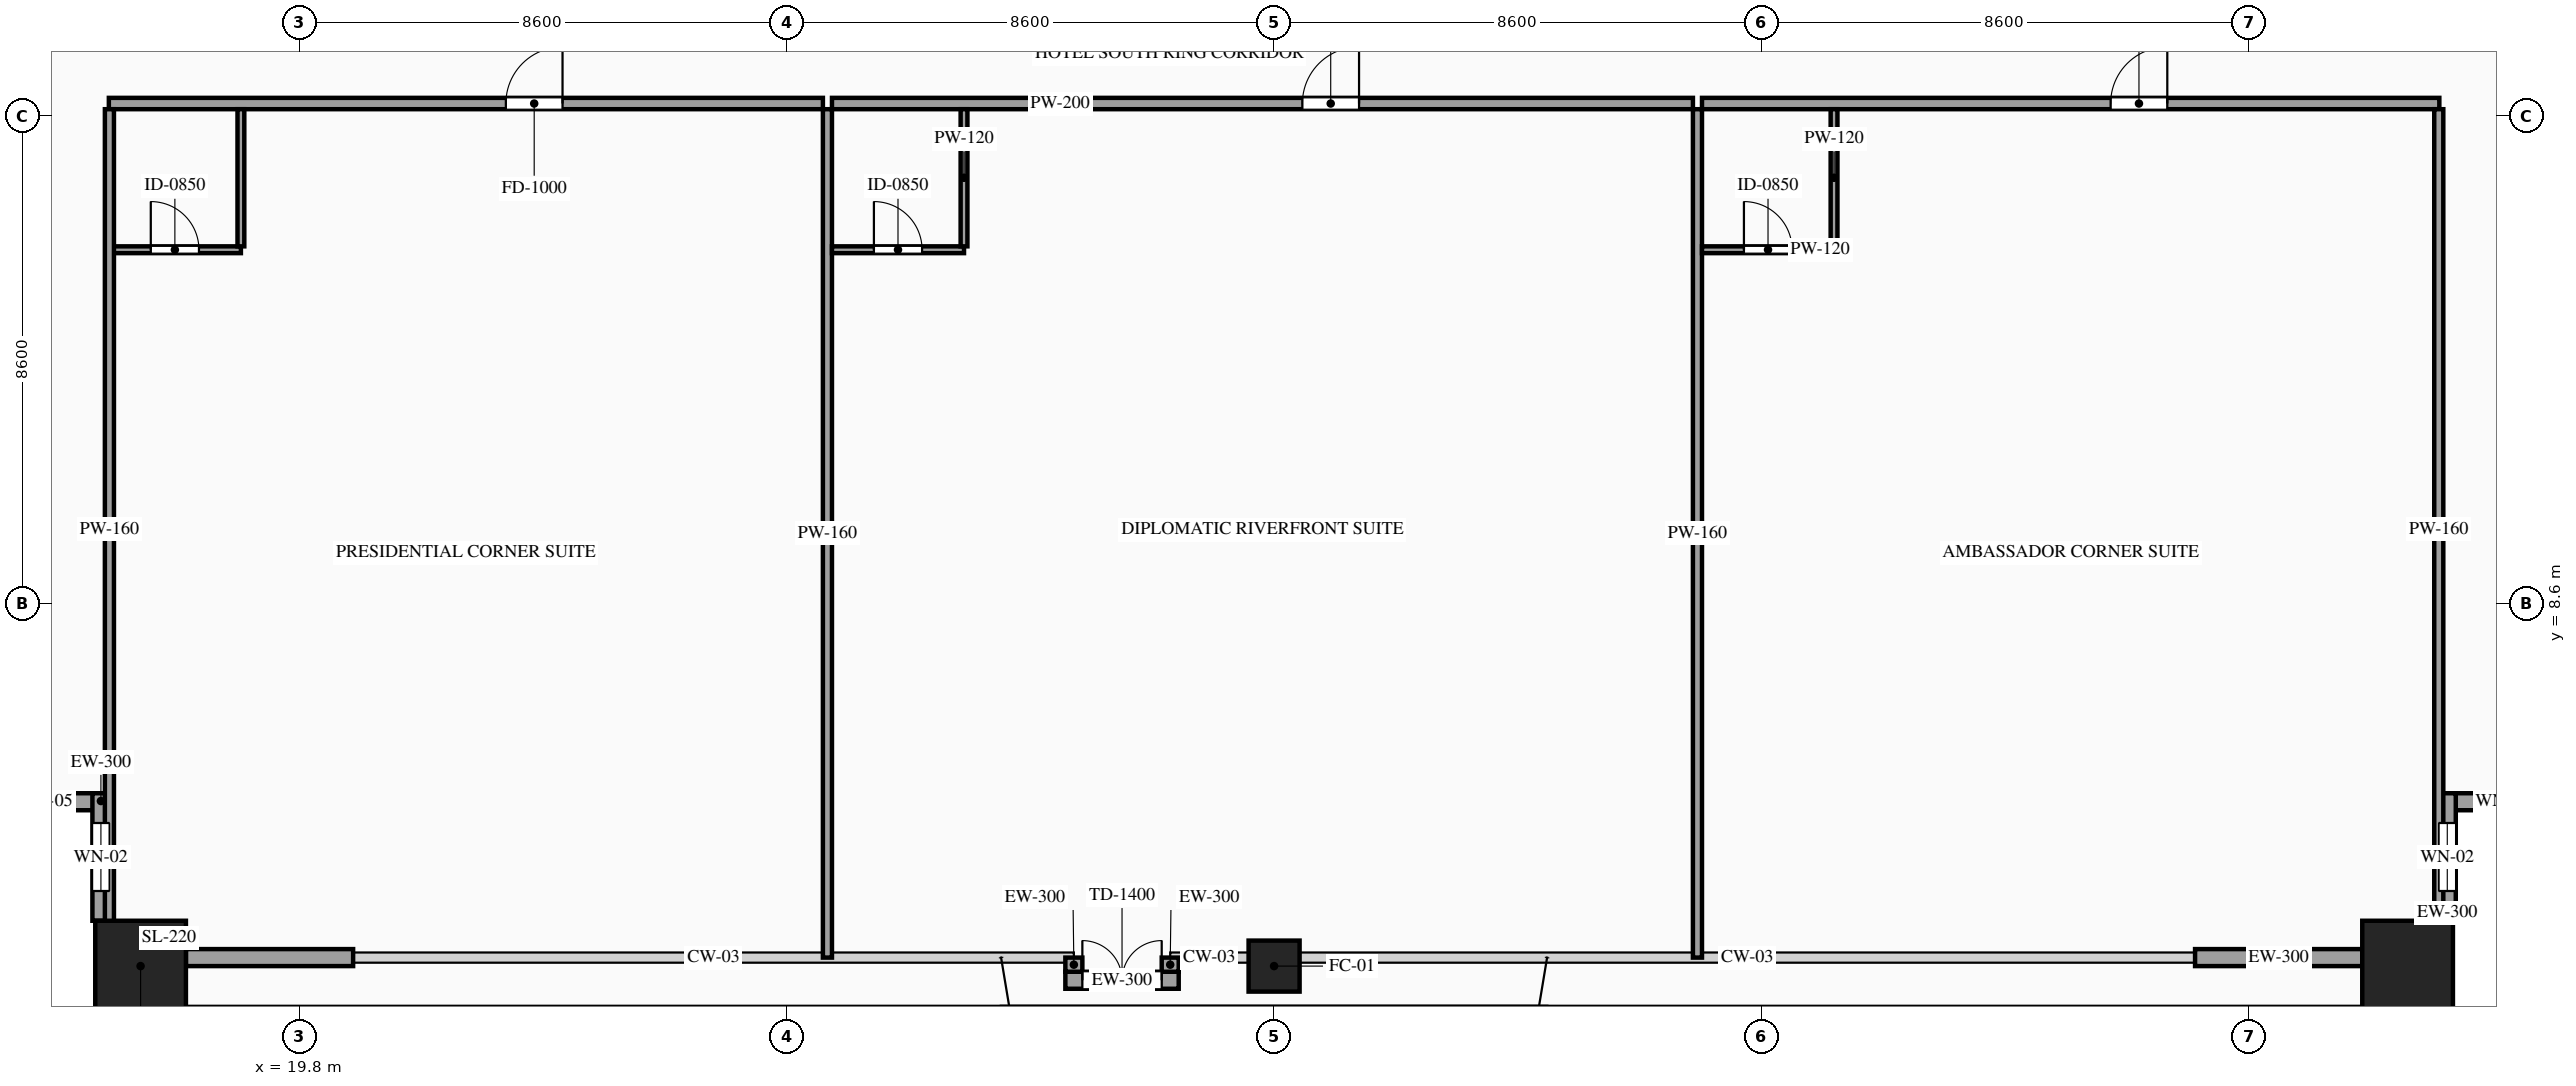
"""IFC4 building model, lengths in metres.
Left out: names, types, materials, properties, quantities, classifications, styles, units other than length and angle.
Written with IfcOpenShell. Run it as: python <this file> out.ifc"""

import sys

from ifc_helpers import new_model, si_unit, direction, frame, frame_2d, origin, origin_2d, place, context, subcontext, project, spatial, rectangle, hollow_rectangle, extrude, source, transform, mapped, element, fill, save


model = new_model("IFC4")
c1 = context("Model", 3, precision=1e-05, world=origin(), true_north=direction((0.0, 1.0)))
c2 = subcontext(c1, "Body", "Model", "MODEL_VIEW")
j1 = project(units=[si_unit("LENGTHUNIT", "METRE"), si_unit("PLANEANGLEUNIT", "RADIAN")], contexts=[c1])
p1 = place(None, origin())
s1 = spatial("IfcSite", under=j1, at=p1, CompositionType="ELEMENT")
p2 = place(p1, origin())
s2 = spatial("IfcBuilding", under=s1, at=p2, CompositionType="ELEMENT")
p3 = place(p2, frame((0.0, 0.0, 101.0)))
s3 = spatial("IfcBuildingStorey", under=s2, at=p3, CompositionType="ELEMENT", Elevation=101.0)
m1 = source(origin(), c2, "Body", "SweptSolid", [
    extrude(hollow_rectangle(XDim=1.6, YDim=1.6, WallThickness=0.07, at=origin_2d()), origin(), (0.0, 0.0, 1.0), 3.6),
])
p4 = place(p3, frame((17.0, 2.2, 0.0), z_axis=(0.0, 0.0, 1.0), x_axis=(1.0, 0.0, 0.0)))
e1 = element("IfcColumn", 1, at=p4, inside=s3, PredefinedType="COLUMN", context=c2, shape_type="MappedRepresentation", body=[
    mapped(m1, transform((0.0, 0.0, 0.0), scale=1.0)),
])
m2 = source(origin(), c2, "Body", "SweptSolid", [
    extrude(hollow_rectangle(XDim=0.9, YDim=0.9, WallThickness=0.042, at=origin_2d()), origin(), (0.0, 0.0, 1.0), 3.6),
])
p5 = place(p3, frame((37.0, 2.2, 0.0), z_axis=(0.0, 0.0, 1.0), x_axis=(1.0, 0.0, 0.0)))
e2 = element("IfcColumn", 2, at=p5, inside=s3, PredefinedType="COLUMN", context=c2, shape_type="MappedRepresentation", body=[
    mapped(m2, transform((0.0, 0.0, 0.0), scale=1.0)),
])
p6 = place(p3, frame((57.0, 2.2, 0.0), z_axis=(0.0, 0.0, 1.0), x_axis=(1.0, 0.0, 0.0)))
e3 = element("IfcColumn", 3, at=p6, inside=s3, PredefinedType="COLUMN", context=c2, shape_type="MappedRepresentation", body=[
    mapped(m1, transform((0.0, 0.0, 0.0), scale=1.0)),
])
p7 = place(p3, frame((14.2, 5.1, 0.0), z_axis=(0.0, 0.0, 1.0), x_axis=(1.0, 0.0, 0.0)))
e4 = element("IfcWall", 4, at=p7, inside=s3, PredefinedType="SOLIDWALL", context=c2, shape_type="SweptSolid", body=[
    extrude(rectangle(XDim=2.25, YDim=0.3, at=frame_2d((1.125, 0.0))), origin(), (0.0, 0.0, 1.0), 3.38),
])
p8 = place(p7, frame((0.675, 0.0, 0.85)))
e5 = element("IfcOpeningElement", 5, at=p8, cuts=e4, PredefinedType="OPENING", context=c2, shape_type="SweptSolid", body=[
    extrude(rectangle(XDim=0.9, YDim=1.5, at=frame_2d((0.45, 0.75))), frame((0.0, 0.165, 0.0), z_axis=(0.0, -1.0, 0.0), x_axis=(1.0, 0.0, 0.0)), (0.0, 0.0, 1.0), 0.33),
])
p9 = place(p3, frame((16.3, 5.25, 0.0), z_axis=(0.0, 0.0, 1.0), x_axis=(0.0, -1.0, 0.0)))
e6 = element("IfcWall", 6, at=p9, inside=s3, PredefinedType="SOLIDWALL", context=c2, shape_type="SweptSolid", body=[
    extrude(rectangle(XDim=2.25, YDim=0.3, at=frame_2d((1.125, 0.0))), origin(), (0.0, 0.0, 1.0), 3.38),
])
p10 = place(p9, frame((0.525, 0.0, 0.85)))
e7 = element("IfcOpeningElement", 7, at=p10, cuts=e6, PredefinedType="OPENING", context=c2, shape_type="SweptSolid", body=[
    extrude(rectangle(XDim=1.2, YDim=2.1, at=frame_2d((0.6, 1.05))), frame((0.0, 0.165, 0.0), z_axis=(0.0, -1.0, 0.0), x_axis=(1.0, 0.0, 0.0)), (0.0, 0.0, 1.0), 0.33),
])
p11 = place(p3, frame((57.55, 5.1, 0.0), z_axis=(0.0, 0.0, 1.0), x_axis=(1.0, 0.0, 0.0)))
e8 = element("IfcWall", 8, at=p11, inside=s3, PredefinedType="SOLIDWALL", context=c2, shape_type="SweptSolid", body=[
    extrude(rectangle(XDim=2.25, YDim=0.3, at=frame_2d((1.125, 0.0))), origin(), (0.0, 0.0, 1.0), 3.38),
])
p12 = place(p11, frame((0.675, 0.0, 0.85)))
e9 = element("IfcOpeningElement", 9, at=p12, cuts=e8, PredefinedType="OPENING", context=c2, shape_type="SweptSolid", body=[
    extrude(rectangle(XDim=0.9, YDim=1.5, at=frame_2d((0.45, 0.75))), frame((0.0, 0.165, 0.0), z_axis=(0.0, -1.0, 0.0), x_axis=(1.0, 0.0, 0.0)), (0.0, 0.0, 1.0), 0.33),
])
p13 = place(p3, frame((57.7, 3.0, 0.0), z_axis=(0.0, 0.0, 1.0), x_axis=(0.0, 1.0, 0.0)))
e10 = element("IfcWall", 10, at=p13, inside=s3, PredefinedType="SOLIDWALL", context=c2, shape_type="SweptSolid", body=[
    extrude(rectangle(XDim=2.25, YDim=0.3, at=frame_2d((1.125, 0.0))), origin(), (0.0, 0.0, 1.0), 3.38),
])
p14 = place(p13, frame((0.525, 0.0, 0.85)))
e11 = element("IfcOpeningElement", 11, at=p14, cuts=e10, PredefinedType="OPENING", context=c2, shape_type="SweptSolid", body=[
    extrude(rectangle(XDim=1.2, YDim=2.1, at=frame_2d((0.6, 1.05))), frame((0.0, 0.165, 0.0), z_axis=(0.0, -1.0, 0.0), x_axis=(1.0, 0.0, 0.0)), (0.0, 0.0, 1.0), 0.33),
])
m3 = source(origin(), c2, "Body", "SweptSolid", [
    extrude(rectangle(XDim=2.95, YDim=0.3, at=frame_2d((1.475, 0.0))), origin(), (0.0, 0.0, 1.0), 2.775),
])
for number, where, z_axis, x_axis in (
    (12, (17.8, 2.35, 0.0), (0.0, 0.0, 1.0), (1.0, 0.0, 0.0)),
    (13, (53.25, 2.35, 0.0), (0.0, 0.0, 1.0), (1.0, 0.0, 0.0)),
):
    element("IfcWall", number, at=place(p3, frame(where, z_axis=z_axis, x_axis=x_axis)), inside=s3, PredefinedType="SOLIDWALL", context=c2, shape_type="MappedRepresentation", body=[
        mapped(m3, transform((0.0, 0.0, 0.0), scale=1.0)),
    ])
p15 = place(p3, frame((33.317, 1.95, 0.0), z_axis=(0.0, 0.0, 1.0), x_axis=(1.0, 0.0, 0.0)))
e14 = element("IfcWall", 14, at=p15, inside=s3, PredefinedType="SOLIDWALL", context=c2, shape_type="SweptSolid", body=[
    extrude(rectangle(XDim=2.0, YDim=0.3, at=frame_2d((1.0, 0.0))), origin(), (0.0, 0.0, 1.0), 3.38),
])
p16 = place(p15, frame((0.3, 0.0, 0.0)))
e15 = element("IfcOpeningElement", 15, at=p16, cuts=e14, PredefinedType="OPENING", context=c2, shape_type="SweptSolid", body=[
    extrude(rectangle(XDim=1.4, YDim=2.3, at=frame_2d((0.7, 1.15))), frame((0.0, 0.165, 0.0), z_axis=(0.0, -1.0, 0.0), x_axis=(1.0, 0.0, 0.0)), (0.0, 0.0, 1.0), 0.33),
])
m4 = source(origin(), c2, "Body", "SweptSolid", [
    extrude(rectangle(XDim=0.25, YDim=0.3, at=frame_2d((0.125, 0.0))), origin(), (0.0, 0.0, 1.0), 3.38),
])
for number, where, z_axis, x_axis in (
    (16, (33.467, 2.35, 0.0), (0.0, 0.0, 1.0), (0.0, -1.0, 0.0)),
    (17, (35.167, 2.1, 0.0), (0.0, 0.0, 1.0), (0.0, 1.0, 0.0)),
):
    element("IfcWall", number, at=place(p3, frame(where, z_axis=z_axis, x_axis=x_axis)), inside=s3, PredefinedType="SOLIDWALL", context=c2, shape_type="MappedRepresentation", body=[
        mapped(m4, transform((0.0, 0.0, 0.0), scale=1.0)),
    ])
p17 = place(p3, frame((16.44, 17.42, 0.0), z_axis=(0.0, 0.0, 1.0), x_axis=(1.0, 0.0, 0.0)))
e18 = element("IfcWall", 18, at=p17, inside=s3, PredefinedType="PARTITIONING", context=c2, shape_type="SweptSolid", body=[
    extrude(rectangle(XDim=12.599, YDim=0.2, at=frame_2d((6.3, 0.0))), origin(), (0.0, 0.0, 1.0), 3.38),
])
p18 = place(p17, frame((7.005, 0.0, 0.0)))
e19 = element("IfcOpeningElement", 19, at=p18, cuts=e18, PredefinedType="OPENING", context=c2, shape_type="SweptSolid", body=[
    extrude(rectangle(XDim=1.0, YDim=2.2, at=frame_2d((0.5, 1.1))), frame((0.0, 0.115, 0.0), z_axis=(0.0, -1.0, 0.0), x_axis=(1.0, 0.0, 0.0)), (0.0, 0.0, 1.0), 0.23),
])
m5 = source(origin(), c2, "Body", "SweptSolid", [
    extrude(rectangle(XDim=14.97, YDim=0.16, at=frame_2d((7.485, 0.0))), origin(), (0.0, 0.0, 1.0), 3.38),
])
p19 = place(p3, frame((29.119, 2.35, 0.0), z_axis=(0.0, 0.0, 1.0), x_axis=(0.0, 1.0, 0.0)))
e20 = element("IfcWall", 20, at=p19, inside=s3, PredefinedType="PARTITIONING", context=c2, shape_type="MappedRepresentation", body=[
    mapped(m5, transform((0.0, 0.0, 0.0), scale=1.0)),
])
p20 = place(p3, frame((16.44, 14.84, 0.0), z_axis=(0.0, 0.0, 1.0), x_axis=(1.0, 0.0, 0.0)))
e21 = element("IfcWall", 21, at=p20, inside=s3, PredefinedType="PARTITIONING", context=c2, shape_type="SweptSolid", body=[
    extrude(rectangle(XDim=2.33, YDim=0.12, at=frame_2d((1.165, 0.0))), origin(), (0.0, 0.0, 1.0), 3.38),
])
p21 = place(p20, frame((0.74, 0.0, 0.0)))
e22 = element("IfcOpeningElement", 22, at=p21, cuts=e21, PredefinedType="OPENING", context=c2, shape_type="SweptSolid", body=[
    extrude(rectangle(XDim=0.85, YDim=2.1, at=frame_2d((0.425, 1.05))), frame((0.0, 0.075, 0.0), z_axis=(0.0, -1.0, 0.0), x_axis=(1.0, 0.0, 0.0)), (0.0, 0.0, 1.0), 0.15),
])
m6 = source(origin(), c2, "Body", "SweptSolid", [
    extrude(rectangle(XDim=2.42, YDim=0.12, at=frame_2d((1.21, 0.0))), origin(), (0.0, 0.0, 1.0), 3.38),
])
p22 = place(p3, frame((18.77, 14.9, 0.0), z_axis=(0.0, 0.0, 1.0), x_axis=(0.0, 1.0, 0.0)))
e23 = element("IfcWall", 23, at=p22, inside=s3, PredefinedType="PARTITIONING", context=c2, shape_type="MappedRepresentation", body=[
    mapped(m6, transform((0.0, 0.0, 0.0), scale=1.0)),
])
p23 = place(p3, frame((29.199, 17.42, 0.0), z_axis=(0.0, 0.0, 1.0), x_axis=(1.0, 0.0, 0.0)))
e24 = element("IfcWall", 24, at=p23, inside=s3, PredefinedType="PARTITIONING", context=c2, shape_type="SweptSolid", body=[
    extrude(rectangle(XDim=15.191, YDim=0.2, at=frame_2d((7.595, 0.0))), origin(), (0.0, 0.0, 1.0), 3.38),
])
p24 = place(p23, frame((8.3, 0.0, 0.0)))
e25 = element("IfcOpeningElement", 25, at=p24, cuts=e24, PredefinedType="OPENING", context=c2, shape_type="SweptSolid", body=[
    extrude(rectangle(XDim=1.0, YDim=2.2, at=frame_2d((0.5, 1.1))), frame((0.0, 0.115, 0.0), z_axis=(0.0, -1.0, 0.0), x_axis=(1.0, 0.0, 0.0)), (0.0, 0.0, 1.0), 0.23),
])
p25 = place(p3, frame((44.47, 2.35, 0.0), z_axis=(0.0, 0.0, 1.0), x_axis=(0.0, 1.0, 0.0)))
e26 = element("IfcWall", 26, at=p25, inside=s3, PredefinedType="PARTITIONING", context=c2, shape_type="MappedRepresentation", body=[
    mapped(m5, transform((0.0, 0.0, 0.0), scale=1.0)),
])
p26 = place(p3, frame((29.199, 14.84, 0.0), z_axis=(0.0, 0.0, 1.0), x_axis=(1.0, 0.0, 0.0)))
e27 = element("IfcWall", 27, at=p26, inside=s3, PredefinedType="PARTITIONING", context=c2, shape_type="SweptSolid", body=[
    extrude(rectangle(XDim=2.33, YDim=0.12, at=frame_2d((1.165, 0.0))), origin(), (0.0, 0.0, 1.0), 3.38),
])
p27 = place(p26, frame((0.74, 0.0, 0.0)))
e28 = element("IfcOpeningElement", 28, at=p27, cuts=e27, PredefinedType="OPENING", context=c2, shape_type="SweptSolid", body=[
    extrude(rectangle(XDim=0.85, YDim=2.1, at=frame_2d((0.425, 1.05))), frame((0.0, 0.075, 0.0), z_axis=(0.0, -1.0, 0.0), x_axis=(1.0, 0.0, 0.0)), (0.0, 0.0, 1.0), 0.15),
])
p28 = place(p3, frame((31.529, 14.9, 0.0), z_axis=(0.0, 0.0, 1.0), x_axis=(0.0, 1.0, 0.0)))
e29 = element("IfcWall", 29, at=p28, inside=s3, PredefinedType="PARTITIONING", context=c2, shape_type="MappedRepresentation", body=[
    mapped(m6, transform((0.0, 0.0, 0.0), scale=1.0)),
])
p29 = place(p3, frame((44.55, 17.42, 0.0), z_axis=(0.0, 0.0, 1.0), x_axis=(1.0, 0.0, 0.0)))
e30 = element("IfcWall", 30, at=p29, inside=s3, PredefinedType="PARTITIONING", context=c2, shape_type="SweptSolid", body=[
    extrude(rectangle(XDim=13.01, YDim=0.2, at=frame_2d((6.505, 0.0))), origin(), (0.0, 0.0, 1.0), 3.38),
])
p30 = place(p29, frame((7.21, 0.0, 0.0)))
e31 = element("IfcOpeningElement", 31, at=p30, cuts=e30, PredefinedType="OPENING", context=c2, shape_type="SweptSolid", body=[
    extrude(rectangle(XDim=1.0, YDim=2.2, at=frame_2d((0.5, 1.1))), frame((0.0, 0.115, 0.0), z_axis=(0.0, -1.0, 0.0), x_axis=(1.0, 0.0, 0.0)), (0.0, 0.0, 1.0), 0.23),
])
m7 = source(origin(), c2, "Body", "SweptSolid", [
    extrude(rectangle(XDim=14.82, YDim=0.16, at=frame_2d((7.41, 0.0))), origin(), (0.0, 0.0, 1.0), 3.38),
])
for number, where, z_axis, x_axis in (
    (32, (16.45, 2.5, 0.0), (0.0, 0.0, 1.0), (0.0, 1.0, 0.0)),
    (33, (57.55, 2.5, 0.0), (0.0, 0.0, 1.0), (0.0, 1.0, 0.0)),
):
    element("IfcWall", number, at=place(p3, frame(where, z_axis=z_axis, x_axis=x_axis)), inside=s3, PredefinedType="PARTITIONING", context=c2, shape_type="MappedRepresentation", body=[
        mapped(m7, transform((0.0, 0.0, 0.0), scale=1.0)),
    ])
p31 = place(p3, frame((44.55, 14.84, 0.0), z_axis=(0.0, 0.0, 1.0), x_axis=(1.0, 0.0, 0.0)))
e34 = element("IfcWall", 34, at=p31, inside=s3, PredefinedType="PARTITIONING", context=c2, shape_type="SweptSolid", body=[
    extrude(rectangle(XDim=2.33, YDim=0.12, at=frame_2d((1.165, 0.0))), origin(), (0.0, 0.0, 1.0), 3.38),
])
p32 = place(p31, frame((0.74, 0.0, 0.0)))
e35 = element("IfcOpeningElement", 35, at=p32, cuts=e34, PredefinedType="OPENING", context=c2, shape_type="SweptSolid", body=[
    extrude(rectangle(XDim=0.85, YDim=2.1, at=frame_2d((0.425, 1.05))), frame((0.0, 0.075, 0.0), z_axis=(0.0, -1.0, 0.0), x_axis=(1.0, 0.0, 0.0)), (0.0, 0.0, 1.0), 0.15),
])
p33 = place(p3, frame((46.88, 14.9, 0.0), z_axis=(0.0, 0.0, 1.0), x_axis=(0.0, 1.0, 0.0)))
e36 = element("IfcWall", 36, at=p33, inside=s3, PredefinedType="PARTITIONING", context=c2, shape_type="MappedRepresentation", body=[
    mapped(m6, transform((0.0, 0.0, 0.0), scale=1.0)),
])
m8 = source(origin(), c2, "Body", "SweptSolid", [
    extrude(rectangle(XDim=0.9, YDim=1.5, at=frame_2d((0.45, 0.75))), frame((0.0, 0.03, 0.0), z_axis=(0.0, -1.0, 0.0), x_axis=(1.0, 0.0, 0.0)), (0.0, 0.0, 1.0), 0.06),
])
p34 = place(p8, origin())
e37 = element("IfcWindow", 37, at=p34, inside=s3, PartitioningType="SINGLE_PANEL", PredefinedType="WINDOW", context=c2, shape_type="MappedRepresentation", body=[
    mapped(m8, transform((0.0, 0.0, 0.0), scale=1.0)),
])
fill(e5, e37)
m9 = source(origin(), c2, "Body", "SweptSolid", [
    extrude(rectangle(XDim=1.2, YDim=2.1, at=frame_2d((0.6, 1.05))), frame((0.0, 0.03, 0.0), z_axis=(0.0, -1.0, 0.0), x_axis=(1.0, 0.0, 0.0)), (0.0, 0.0, 1.0), 0.06),
])
p35 = place(p10, origin())
e38 = element("IfcWindow", 38, at=p35, inside=s3, PartitioningType="SINGLE_PANEL", PredefinedType="WINDOW", context=c2, shape_type="MappedRepresentation", body=[
    mapped(m9, transform((0.0, 0.0, 0.0), scale=1.0)),
])
fill(e7, e38)
p36 = place(p12, origin())
e39 = element("IfcWindow", 39, at=p36, inside=s3, PartitioningType="SINGLE_PANEL", PredefinedType="WINDOW", context=c2, shape_type="MappedRepresentation", body=[
    mapped(m8, transform((0.0, 0.0, 0.0), scale=1.0)),
])
fill(e9, e39)
p37 = place(p14, origin())
e40 = element("IfcWindow", 40, at=p37, inside=s3, PartitioningType="SINGLE_PANEL", PredefinedType="WINDOW", context=c2, shape_type="MappedRepresentation", body=[
    mapped(m9, transform((0.0, 0.0, 0.0), scale=1.0)),
])
fill(e11, e40)
m10 = source(origin(), c2, "Body", "SweptSolid", [
    extrude(rectangle(XDim=1.4, YDim=2.3, at=frame_2d((0.7, 1.15))), frame((0.0, 0.025, 0.0), z_axis=(0.0, -1.0, 0.0), x_axis=(1.0, 0.0, 0.0)), (0.0, 0.0, 1.0), 0.05),
])
p38 = place(p16, origin())
e41 = element("IfcDoor", 41, at=p38, inside=s3, OperationType="DOUBLE_DOOR_SINGLE_SWING", PredefinedType="DOOR", context=c2, shape_type="MappedRepresentation", body=[
    mapped(m10, transform((0.0, 0.0, 0.0), scale=1.0)),
])
fill(e15, e41)
m11 = source(origin(), c2, "Body", "SweptSolid", [
    extrude(rectangle(XDim=1.0, YDim=2.2, at=frame_2d((0.5, 1.1))), frame((0.0, 0.025, 0.0), z_axis=(0.0, -1.0, 0.0), x_axis=(1.0, 0.0, 0.0)), (0.0, 0.0, 1.0), 0.05),
])
p39 = place(p18, origin())
e42 = element("IfcDoor", 42, at=p39, inside=s3, OperationType="SINGLE_SWING_RIGHT", PredefinedType="DOOR", context=c2, shape_type="MappedRepresentation", body=[
    mapped(m11, transform((0.0, 0.0, 0.0), scale=1.0)),
])
fill(e19, e42)
m12 = source(origin(), c2, "Body", "SweptSolid", [
    extrude(rectangle(XDim=0.85, YDim=2.1, at=frame_2d((0.425, 1.05))), frame((0.0, 0.025, 0.0), z_axis=(0.0, -1.0, 0.0), x_axis=(1.0, 0.0, 0.0)), (0.0, 0.0, 1.0), 0.05),
])
p40 = place(p21, origin())
e43 = element("IfcDoor", 43, at=p40, inside=s3, OperationType="SINGLE_SWING_LEFT", PredefinedType="DOOR", context=c2, shape_type="MappedRepresentation", body=[
    mapped(m12, transform((0.0, 0.0, 0.0), scale=1.0)),
])
fill(e22, e43)
p41 = place(p24, origin())
e44 = element("IfcDoor", 44, at=p41, inside=s3, OperationType="SINGLE_SWING_RIGHT", PredefinedType="DOOR", context=c2, shape_type="MappedRepresentation", body=[
    mapped(m11, transform((0.0, 0.0, 0.0), scale=1.0)),
])
fill(e25, e44)
p42 = place(p27, origin())
e45 = element("IfcDoor", 45, at=p42, inside=s3, OperationType="SINGLE_SWING_LEFT", PredefinedType="DOOR", context=c2, shape_type="MappedRepresentation", body=[
    mapped(m12, transform((0.0, 0.0, 0.0), scale=1.0)),
])
fill(e28, e45)
p43 = place(p30, origin())
e46 = element("IfcDoor", 46, at=p43, inside=s3, OperationType="SINGLE_SWING_RIGHT", PredefinedType="DOOR", context=c2, shape_type="MappedRepresentation", body=[
    mapped(m11, transform((0.0, 0.0, 0.0), scale=1.0)),
])
fill(e31, e46)
p44 = place(p32, origin())
e47 = element("IfcDoor", 47, at=p44, inside=s3, OperationType="SINGLE_SWING_LEFT", PredefinedType="DOOR", context=c2, shape_type="MappedRepresentation", body=[
    mapped(m12, transform((0.0, 0.0, 0.0), scale=1.0)),
])
fill(e35, e47)
save(model, sys.argv[1])
